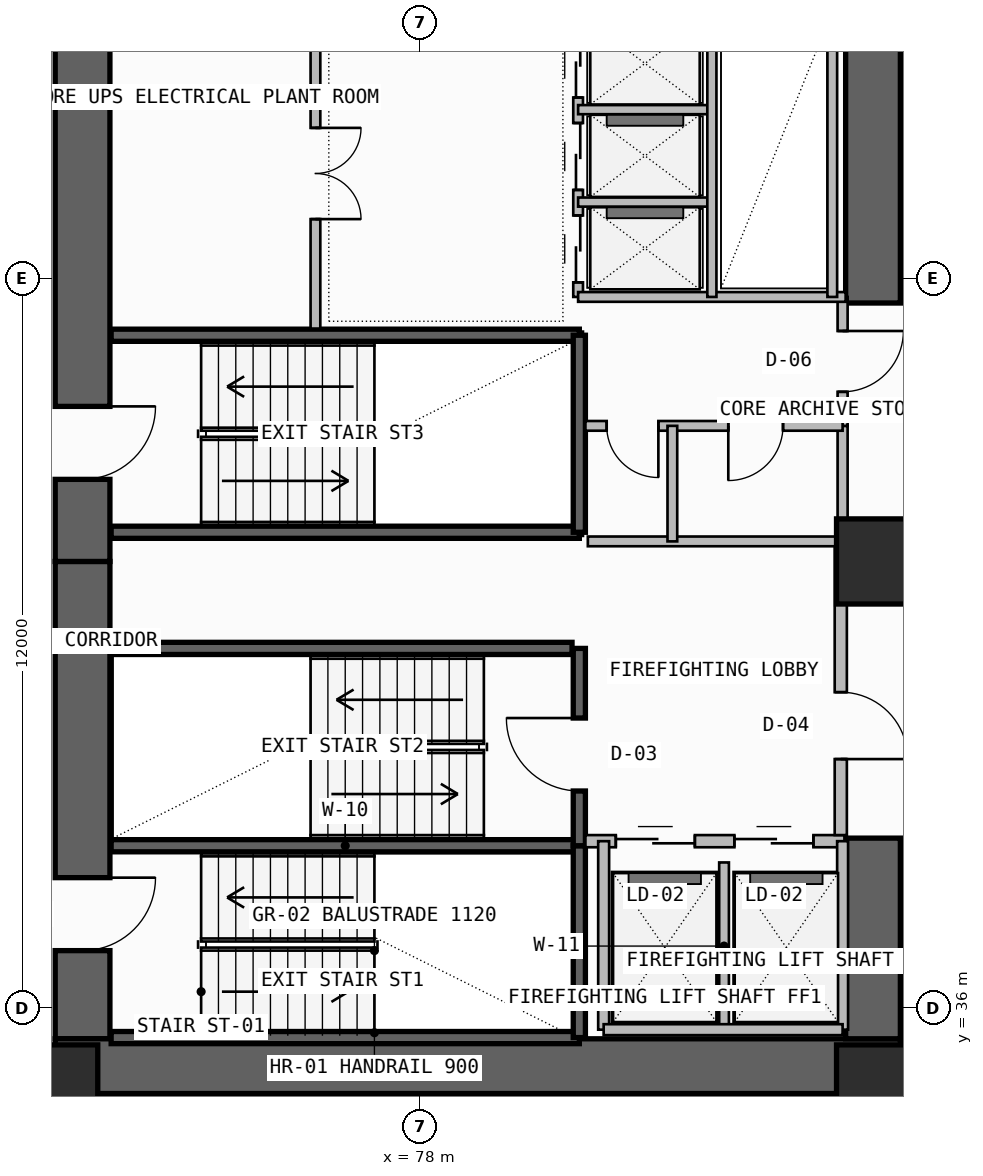
"""IFC4 building model, lengths in metres.
Left out: names, types, materials, properties, quantities, classifications, styles, units other than length and angle.
Written with IfcOpenShell. Run it as: python <this file> out.ifc"""

import sys

from ifc_helpers import new_model, si_unit, direction, frame, frame_2d, origin, origin_2d, place, context, subcontext, project, spatial, rectangle, extrude, element, fill, save


model = new_model("IFC4")
c1 = context("Model", 3, precision=1e-05, world=origin(), true_north=direction((0.0, 1.0)))
c2 = subcontext(c1, "Body", "Model", "MODEL_VIEW")
j1 = project(units=[si_unit("LENGTHUNIT", "METRE"), si_unit("PLANEANGLEUNIT", "RADIAN")], contexts=[c1])
p1 = place(None, origin())
s1 = spatial("IfcSite", under=j1, at=p1, CompositionType="ELEMENT")
p2 = place(p1, origin())
s2 = spatial("IfcBuilding", under=s1, at=p2, CompositionType="ELEMENT")
p3 = place(p2, frame((0.0, 0.0, 139.5)))
s3 = spatial("IfcBuildingStorey", under=s2, at=p3, CompositionType="ELEMENT", Elevation=139.5)
p4 = place(p3, frame((72.45, 35.5, -0.26), z_axis=(0.0, 0.0, 1.0), x_axis=(0.0, 1.0, 0.0)))
e1 = element("IfcWall", 1, at=p4, inside=s3, PredefinedType="SHEAR", context=c2, shape_type="SweptSolid", body=[
    extrude(rectangle(XDim=7.85, YDim=0.9, at=frame_2d((3.925, 0.0))), origin(), (0.0, 0.0, 1.0), 3.6),
])
p5 = place(p4, frame((1.45, 0.0, 0.26)))
e2 = element("IfcOpeningElement", 2, at=p5, cuts=e1, PredefinedType="OPENING", context=c2, shape_type="SweptSolid", body=[
    extrude(rectangle(XDim=1.2, YDim=2.2, at=frame_2d((0.6, 1.1))), frame((0.0, 0.46, 0.0), z_axis=(0.0, -1.0, 0.0), x_axis=(1.0, 0.0, 0.0)), (0.0, 0.0, 1.0), 0.92),
])
p6 = place(p3, frame((72.0, 35.05, -0.26), z_axis=(0.0, 0.0, 1.0), x_axis=(1.0, 0.0, 0.0)))
e3 = element("IfcWall", 3, at=p6, inside=s3, PredefinedType="SHEAR", context=c2, shape_type="SweptSolid", body=[
    extrude(rectangle(XDim=13.9, YDim=0.9, at=frame_2d((6.95, 0.0))), origin(), (0.0, 0.0, 1.0), 3.6),
])
p7 = place(p3, frame((85.45, 35.5, -0.26), z_axis=(0.0, 0.0, 1.0), x_axis=(0.0, 1.0, 0.0)))
e4 = element("IfcWall", 4, at=p7, inside=s3, PredefinedType="SHEAR", context=c2, shape_type="SweptSolid", body=[
    extrude(rectangle(XDim=3.3, YDim=0.9, at=frame_2d((1.65, 0.0))), origin(), (0.0, 0.0, 1.0), 3.6),
])
p8 = place(p3, frame((72.45, 43.35, -0.26), z_axis=(0.0, 0.0, 1.0), x_axis=(0.0, 1.0, 0.0)))
e5 = element("IfcWall", 5, at=p8, inside=s3, PredefinedType="SHEAR", context=c2, shape_type="SweptSolid", body=[
    extrude(rectangle(XDim=12.7, YDim=0.9, at=frame_2d((6.35, 0.0))), origin(), (0.0, 0.0, 1.0), 3.6),
])
p9 = place(p8, frame((1.35, 0.0, 0.26)))
e6 = element("IfcOpeningElement", 6, at=p9, cuts=e5, PredefinedType="OPENING", context=c2, shape_type="SweptSolid", body=[
    extrude(rectangle(XDim=1.2, YDim=2.2, at=frame_2d((0.6, 1.1))), frame((0.0, 0.46, 0.0), z_axis=(0.0, -1.0, 0.0), x_axis=(1.0, 0.0, 0.0)), (0.0, 0.0, 1.0), 0.92),
])
p10 = place(p3, frame((85.45, 47.6, -0.26), z_axis=(0.0, 0.0, 1.0), x_axis=(0.0, 1.0, 0.0)))
e7 = element("IfcWall", 7, at=p10, inside=s3, PredefinedType="SHEAR", context=c2, shape_type="SweptSolid", body=[
    extrude(rectangle(XDim=8.45, YDim=0.9, at=frame_2d((4.225, 0.0))), origin(), (0.0, 0.0, 1.0), 3.6),
])
for number, where, z_axis, x_axis in (
    (8, (72.0, 34.7, 0.0), (0.0, 0.0, 1.0), (1.0, 0.0, 0.0)),
    (9, (85.55, 34.7, 0.0), (0.0, 0.0, 1.0), (1.0, 0.0, 0.0)),
    (10, (85.55, 43.35, 0.0), (0.0, 0.0, 1.0), (1.0, 0.0, 0.0)),
):
    element("IfcColumn", number, at=place(p3, frame(where, z_axis=z_axis, x_axis=x_axis)), inside=s3, PredefinedType="COLUMN", context=c2, shape_type="SweptSolid", body=[
        extrude(rectangle(XDim=1.4, YDim=1.4, at=origin_2d()), origin(), (0.0, 0.0, 1.0), 3.6),
    ])
for number, where, z_axis, x_axis in (
    (11, (72.92, 35.52, -0.26), (0.0, 0.0, 1.0), (1.0, 0.0, 0.0)),
    (12, (72.92, 38.675, -0.26), (0.0, 0.0, 1.0), (1.0, 0.0, 0.0)),
):
    element("IfcWall", number, at=place(p3, frame(where, z_axis=z_axis, x_axis=x_axis)), inside=s3, PredefinedType="SOLIDWALL", context=c2, shape_type="SweptSolid", body=[
        extrude(rectangle(XDim=7.7, YDim=0.2, at=frame_2d((3.85, 0.0))), origin(), (0.0, 0.0, 1.0), 3.6),
    ])
p11 = place(p3, frame((80.62, 35.52, -0.26), z_axis=(0.0, 0.0, 1.0), x_axis=(0.0, 1.0, 0.0)))
e13 = element("IfcWall", 13, at=p11, inside=s3, PredefinedType="SOLIDWALL", context=c2, shape_type="SweptSolid", body=[
    extrude(rectangle(XDim=3.155, YDim=0.2, at=frame_2d((1.578, 0.0))), origin(), (0.0, 0.0, 1.0), 3.6),
])
p12 = place(p3, frame((80.62, 38.675, -0.26), z_axis=(0.0, 0.0, 1.0), x_axis=(0.0, 1.0, 0.0)))
e14 = element("IfcWall", 14, at=p12, inside=s3, PredefinedType="SOLIDWALL", context=c2, shape_type="SweptSolid", body=[
    extrude(rectangle(XDim=3.245, YDim=0.2, at=frame_2d((1.623, 0.0))), origin(), (0.0, 0.0, 1.0), 3.6),
])
p13 = place(p12, frame((0.9, 0.0, 0.26)))
e15 = element("IfcOpeningElement", 15, at=p13, cuts=e14, PredefinedType="OPENING", context=c2, shape_type="SweptSolid", body=[
    extrude(rectangle(XDim=1.2, YDim=2.2, at=frame_2d((0.6, 1.1))), frame((0.0, 0.11, 0.0), z_axis=(0.0, -1.0, 0.0), x_axis=(1.0, 0.0, 0.0)), (0.0, 0.0, 1.0), 0.22),
])
p14 = place(p3, frame((80.72, 38.75, 0.0), z_axis=(0.0, 0.0, 1.0), x_axis=(1.0, 0.0, 0.0)))
e16 = element("IfcWall", 16, at=p14, inside=s3, PredefinedType="SOLIDWALL", context=c2, shape_type="SweptSolid", body=[
    extrude(rectangle(XDim=4.26, YDim=0.2, at=frame_2d((2.13, 0.0))), origin(), (0.0, 0.0, 1.0), 3.34),
])
p15 = place(p14, frame((0.5, 0.0, 0.0)))
e17 = element("IfcOpeningElement", 17, at=p15, cuts=e16, PredefinedType="OPENING", context=c2, shape_type="SweptSolid", body=[
    extrude(rectangle(XDim=1.3, YDim=2.3, at=frame_2d((0.65, 1.15))), frame((0.0, 0.11, 0.0), z_axis=(0.0, -1.0, 0.0), x_axis=(1.0, 0.0, 0.0)), (0.0, 0.0, 1.0), 0.22),
])
p16 = place(p14, frame((2.45, 0.0, 0.0)))
e18 = element("IfcOpeningElement", 18, at=p16, cuts=e16, PredefinedType="OPENING", context=c2, shape_type="SweptSolid", body=[
    extrude(rectangle(XDim=1.3, YDim=2.3, at=frame_2d((0.65, 1.15))), frame((0.0, 0.11, 0.0), z_axis=(0.0, -1.0, 0.0), x_axis=(1.0, 0.0, 0.0)), (0.0, 0.0, 1.0), 0.22),
])
p17 = place(p3, frame((83.0, 35.65, 0.0), z_axis=(0.0, 0.0, 1.0), x_axis=(0.0, 1.0, 0.0)))
e19 = element("IfcWall", 19, at=p17, inside=s3, PredefinedType="PLUMBINGWALL", context=c2, shape_type="SweptSolid", body=[
    extrude(rectangle(XDim=2.75, YDim=0.16, at=frame_2d((1.375, 0.0))), origin(), (0.0, 0.0, 1.0), 3.34),
])
for number, where, z_axis, x_axis in (
    (20, (84.95, 35.65, 0.0), (0.0, 0.0, 1.0), (0.0, 1.0, 0.0)),
    (21, (81.02, 35.65, 0.0), (0.0, 0.0, 1.0), (0.0, 1.0, 0.0)),
):
    element("IfcWall", number, at=place(p3, frame(where, z_axis=z_axis, x_axis=x_axis)), inside=s3, PredefinedType="SOLIDWALL", context=c2, shape_type="SweptSolid", body=[
        extrude(rectangle(XDim=3.1, YDim=0.18, at=frame_2d((1.55, 0.0))), origin(), (0.0, 0.0, 1.0), 3.34),
    ])
p18 = place(p3, frame((81.02, 35.65, 0.0), z_axis=(0.0, 0.0, 1.0), x_axis=(1.0, 0.0, 0.0)))
e22 = element("IfcWall", 22, at=p18, inside=s3, PredefinedType="SOLIDWALL", context=c2, shape_type="SweptSolid", body=[
    extrude(rectangle(XDim=3.93, YDim=0.18, at=frame_2d((1.965, 0.0))), origin(), (0.0, 0.0, 1.0), 3.34),
])
p19 = place(p3, frame((84.92, 38.85, 0.0), z_axis=(0.0, 0.0, 1.0), x_axis=(0.0, 1.0, 0.0)))
e23 = element("IfcWall", 23, at=p19, inside=s3, PredefinedType="SOLIDWALL", context=c2, shape_type="SweptSolid", body=[
    extrude(rectangle(XDim=4.83, YDim=0.2, at=frame_2d((2.415, 0.0))), origin(), (0.0, 0.0, 1.0), 3.34),
])
p20 = place(p19, frame((1.25, 0.0, 0.0)))
e24 = element("IfcOpeningElement", 24, at=p20, cuts=e23, PredefinedType="OPENING", context=c2, shape_type="SweptSolid", body=[
    extrude(rectangle(XDim=1.1, YDim=2.2, at=frame_2d((0.55, 1.1))), frame((0.0, 0.11, 0.0), z_axis=(0.0, -1.0, 0.0), x_axis=(1.0, 0.0, 0.0)), (0.0, 0.0, 1.0), 0.22),
])
p21 = place(p3, frame((72.92, 41.92, -0.26), z_axis=(0.0, 0.0, 1.0), x_axis=(1.0, 0.0, 0.0)))
e25 = element("IfcWall", 25, at=p21, inside=s3, PredefinedType="SOLIDWALL", context=c2, shape_type="SweptSolid", body=[
    extrude(rectangle(XDim=7.58, YDim=0.2, at=frame_2d((3.79, 0.0))), origin(), (0.0, 0.0, 1.0), 3.6),
])
for number, where, z_axis, x_axis in (
    (26, (72.92, 43.83, -0.26), (0.0, 0.0, 1.0), (1.0, 0.0, 0.0)),
    (27, (72.92, 47.07, -0.26), (0.0, 0.0, 1.0), (1.0, 0.0, 0.0)),
):
    element("IfcWall", number, at=place(p3, frame(where, z_axis=z_axis, x_axis=x_axis)), inside=s3, PredefinedType="SOLIDWALL", context=c2, shape_type="SweptSolid", body=[
        extrude(rectangle(XDim=7.7, YDim=0.2, at=frame_2d((3.85, 0.0))), origin(), (0.0, 0.0, 1.0), 3.6),
    ])
p22 = place(p3, frame((80.62, 43.83, -0.26), z_axis=(0.0, 0.0, 1.0), x_axis=(0.0, 1.0, 0.0)))
e28 = element("IfcWall", 28, at=p22, inside=s3, PredefinedType="SOLIDWALL", context=c2, shape_type="SweptSolid", body=[
    extrude(rectangle(XDim=3.24, YDim=0.2, at=frame_2d((1.62, 0.0))), origin(), (0.0, 0.0, 1.0), 3.6),
])
p23 = place(p3, frame((84.95, 43.68, 0.0), z_axis=(0.0, 0.0, 1.0), x_axis=(0.0, 1.0, 0.0)))
e29 = element("IfcWall", 29, at=p23, inside=s3, PredefinedType="PLUMBINGWALL", context=c2, shape_type="SweptSolid", body=[
    extrude(rectangle(XDim=1.9, YDim=0.165, at=frame_2d((0.95, 0.0))), origin(), (0.0, 0.0, 1.0), 3.34),
])
p24 = place(p3, frame((84.95, 45.58, 0.0), z_axis=(0.0, 0.0, 1.0), x_axis=(0.0, 1.0, 0.0)))
e30 = element("IfcWall", 30, at=p24, inside=s3, PredefinedType="PARTITIONING", context=c2, shape_type="SweptSolid", body=[
    extrude(rectangle(XDim=2.12, YDim=0.165, at=frame_2d((1.06, 0.0))), origin(), (0.0, 0.0, 1.0), 3.34),
])
p25 = place(p24, frame((0.56, 0.0, 0.0)))
e31 = element("IfcOpeningElement", 31, at=p25, cuts=e30, PredefinedType="OPENING", context=c2, shape_type="SweptSolid", body=[
    extrude(rectangle(XDim=1.0, YDim=2.2, at=frame_2d((0.5, 1.1))), frame((0.0, 0.093, 0.0), z_axis=(0.0, -1.0, 0.0), x_axis=(1.0, 0.0, 0.0)), (0.0, 0.0, 1.0), 0.185),
])
p26 = place(p3, frame((80.72, 45.58, 0.0), z_axis=(0.0, 0.0, 1.0), x_axis=(1.0, 0.0, 0.0)))
e32 = element("IfcWall", 32, at=p26, inside=s3, PredefinedType="PLUMBINGWALL", context=c2, shape_type="SweptSolid", body=[
    extrude(rectangle(XDim=4.23, YDim=0.16, at=frame_2d((2.115, 0.0))), origin(), (0.0, 0.0, 1.0), 3.34),
])
p27 = place(p26, frame((0.35, 0.0, 0.0)))
e33 = element("IfcOpeningElement", 33, at=p27, cuts=e32, PredefinedType="OPENING", context=c2, shape_type="SweptSolid", body=[
    extrude(rectangle(XDim=0.85, YDim=2.05, at=frame_2d((0.425, 1.025))), frame((0.0, 0.09, 0.0), z_axis=(0.0, -1.0, 0.0), x_axis=(1.0, 0.0, 0.0)), (0.0, 0.0, 1.0), 0.18),
])
p28 = place(p26, frame((2.35, 0.0, 0.0)))
e34 = element("IfcOpeningElement", 34, at=p28, cuts=e32, PredefinedType="OPENING", context=c2, shape_type="SweptSolid", body=[
    extrude(rectangle(XDim=0.9, YDim=2.1, at=frame_2d((0.45, 1.05))), frame((0.0, 0.09, 0.0), z_axis=(0.0, -1.0, 0.0), x_axis=(1.0, 0.0, 0.0)), (0.0, 0.0, 1.0), 0.18),
])
p29 = place(p3, frame((80.76, 43.68, 0.0), z_axis=(0.0, 0.0, 1.0), x_axis=(1.0, 0.0, 0.0)))
e35 = element("IfcWall", 35, at=p29, inside=s3, PredefinedType="PLUMBINGWALL", context=c2, shape_type="SweptSolid", body=[
    extrude(rectangle(XDim=4.19, YDim=0.16, at=frame_2d((2.095, 0.0))), origin(), (0.0, 0.0, 1.0), 3.34),
])
p30 = place(p3, frame((82.15, 43.68, 0.0), z_axis=(0.0, 0.0, 1.0), x_axis=(0.0, 1.0, 0.0)))
e36 = element("IfcWall", 36, at=p30, inside=s3, PredefinedType="PLUMBINGWALL", context=c2, shape_type="SweptSolid", body=[
    extrude(rectangle(XDim=1.9, YDim=0.16, at=frame_2d((0.95, 0.0))), origin(), (0.0, 0.0, 1.0), 3.34),
])
p31 = place(p3, frame((76.28, 47.18, 0.0), z_axis=(0.0, 0.0, 1.0), x_axis=(0.0, 1.0, 0.0)))
e37 = element("IfcWall", 37, at=p31, inside=s3, PredefinedType="SOLIDWALL", context=c2, shape_type="SweptSolid", body=[
    extrude(rectangle(XDim=5.14, YDim=0.16, at=frame_2d((2.57, 0.0))), origin(), (0.0, 0.0, 1.0), 3.34),
])
p32 = place(p31, frame((1.8, 0.0, 0.0)))
e38 = element("IfcOpeningElement", 38, at=p32, cuts=e37, PredefinedType="OPENING", context=c2, shape_type="SweptSolid", body=[
    extrude(rectangle(XDim=1.5, YDim=2.25, at=frame_2d((0.75, 1.125))), frame((0.0, 0.09, 0.0), z_axis=(0.0, -1.0, 0.0), x_axis=(1.0, 0.0, 0.0)), (0.0, 0.0, 1.0), 0.18),
])
p33 = place(p3, frame((80.6, 47.7, 0.0), z_axis=(0.0, 0.0, 1.0), x_axis=(0.0, 1.0, 0.0)))
e39 = element("IfcWall", 39, at=p33, inside=s3, PredefinedType="SOLIDWALL", context=c2, shape_type="SweptSolid", body=[
    extrude(rectangle(XDim=4.6, YDim=0.16, at=frame_2d((2.3, 0.0))), origin(), (0.0, 0.0, 1.0), 3.34),
])
p34 = place(p33, frame((0.24, 0.0, 0.0)))
e40 = element("IfcOpeningElement", 40, at=p34, cuts=e39, PredefinedType="OPENING", context=c2, shape_type="SweptSolid", body=[
    extrude(rectangle(XDim=1.1, YDim=2.25, at=frame_2d((0.55, 1.125))), frame((0.0, 0.09, 0.0), z_axis=(0.0, -1.0, 0.0), x_axis=(1.0, 0.0, 0.0)), (0.0, 0.0, 1.0), 0.18),
])
p35 = place(p33, frame((1.76, 0.0, 0.0)))
e41 = element("IfcOpeningElement", 41, at=p35, cuts=e39, PredefinedType="OPENING", context=c2, shape_type="SweptSolid", body=[
    extrude(rectangle(XDim=1.1, YDim=2.25, at=frame_2d((0.55, 1.125))), frame((0.0, 0.09, 0.0), z_axis=(0.0, -1.0, 0.0), x_axis=(1.0, 0.0, 0.0)), (0.0, 0.0, 1.0), 0.18),
])
p36 = place(p33, frame((3.28, 0.0, 0.0)))
e42 = element("IfcOpeningElement", 42, at=p36, cuts=e39, PredefinedType="OPENING", context=c2, shape_type="SweptSolid", body=[
    extrude(rectangle(XDim=1.1, YDim=2.25, at=frame_2d((0.55, 1.125))), frame((0.0, 0.09, 0.0), z_axis=(0.0, -1.0, 0.0), x_axis=(1.0, 0.0, 0.0)), (0.0, 0.0, 1.0), 0.18),
])
p37 = place(p3, frame((80.6, 47.7, 0.0), z_axis=(0.0, 0.0, 1.0), x_axis=(1.0, 0.0, 0.0)))
e43 = element("IfcWall", 43, at=p37, inside=s3, PredefinedType="SOLIDWALL", context=c2, shape_type="SweptSolid", body=[
    extrude(rectangle(XDim=4.4, YDim=0.16, at=frame_2d((2.2, 0.0))), origin(), (0.0, 0.0, 1.0), 3.34),
])
for number, where, z_axis, x_axis in (
    (44, (80.6, 49.26, 0.0), (0.0, 0.0, 1.0), (1.0, 0.0, 0.0)),
    (45, (80.6, 50.78, 0.0), (0.0, 0.0, 1.0), (1.0, 0.0, 0.0)),
):
    element("IfcWall", number, at=place(p3, frame(where, z_axis=z_axis, x_axis=x_axis)), inside=s3, PredefinedType="PLUMBINGWALL", context=c2, shape_type="SweptSolid", body=[
        extrude(rectangle(XDim=2.2, YDim=0.15, at=frame_2d((1.1, 0.0))), origin(), (0.0, 0.0, 1.0), 3.34),
    ])
p38 = place(p3, frame((82.8, 47.7, 0.0), z_axis=(0.0, 0.0, 1.0), x_axis=(0.0, 1.0, 0.0)))
e46 = element("IfcWall", 46, at=p38, inside=s3, PredefinedType="PLUMBINGWALL", context=c2, shape_type="SweptSolid", body=[
    extrude(rectangle(XDim=4.6, YDim=0.15, at=frame_2d((2.3, 0.0))), origin(), (0.0, 0.0, 1.0), 3.34),
])
p39 = place(p3, frame((84.78, 47.7, 0.0), z_axis=(0.0, 0.0, 1.0), x_axis=(0.0, 1.0, 0.0)))
e47 = element("IfcWall", 47, at=p39, inside=s3, PredefinedType="SOLIDWALL", context=c2, shape_type="SweptSolid", body=[
    extrude(rectangle(XDim=4.6, YDim=0.16, at=frame_2d((2.3, 0.0))), origin(), (0.0, 0.0, 1.0), 3.34),
])
p40 = place(p5, frame((1.2, 0.0, 0.0), z_axis=(0.0, 0.0, 1.0), x_axis=(-1.0, 0.0, 0.0)))
e48 = element("IfcDoor", 48, at=p40, inside=s3, OperationType="SINGLE_SWING_LEFT", PredefinedType="USERDEFINED", context=c2, shape_type="SweptSolid", body=[
    extrude(rectangle(XDim=1.2, YDim=2.2, at=frame_2d((0.6, 1.1))), frame((0.0, 0.025, 0.0), z_axis=(0.0, -1.0, 0.0), x_axis=(1.0, 0.0, 0.0)), (0.0, 0.0, 1.0), 0.05),
])
fill(e2, e48)
p41 = place(p13, origin())
e49 = element("IfcDoor", 49, at=p41, inside=s3, OperationType="SINGLE_SWING_RIGHT", PredefinedType="USERDEFINED", context=c2, shape_type="SweptSolid", body=[
    extrude(rectangle(XDim=1.2, YDim=2.2, at=frame_2d((0.6, 1.1))), frame((0.0, 0.025, 0.0), z_axis=(0.0, -1.0, 0.0), x_axis=(1.0, 0.0, 0.0)), (0.0, 0.0, 1.0), 0.05),
])
fill(e15, e49)
p42 = place(p15, origin())
e50 = element("IfcDoor", 50, at=p42, inside=s3, OperationType="DOUBLE_DOOR_SLIDING", PredefinedType="DOOR", context=c2, shape_type="SweptSolid", body=[
    extrude(rectangle(XDim=1.3, YDim=2.3, at=frame_2d((0.65, 1.15))), frame((0.0, 0.025, 0.0), z_axis=(0.0, -1.0, 0.0), x_axis=(1.0, 0.0, 0.0)), (0.0, 0.0, 1.0), 0.05),
])
fill(e17, e50)
p43 = place(p16, origin())
e51 = element("IfcDoor", 51, at=p43, inside=s3, OperationType="DOUBLE_DOOR_SLIDING", PredefinedType="DOOR", context=c2, shape_type="SweptSolid", body=[
    extrude(rectangle(XDim=1.3, YDim=2.3, at=frame_2d((0.65, 1.15))), frame((0.0, 0.025, 0.0), z_axis=(0.0, -1.0, 0.0), x_axis=(1.0, 0.0, 0.0)), (0.0, 0.0, 1.0), 0.05),
])
fill(e18, e51)
p44 = place(p20, frame((1.1, 0.0, 0.0), z_axis=(0.0, 0.0, 1.0), x_axis=(-1.0, 0.0, 0.0)))
e52 = element("IfcDoor", 52, at=p44, inside=s3, OperationType="SINGLE_SWING_RIGHT", PredefinedType="DOOR", context=c2, shape_type="SweptSolid", body=[
    extrude(rectangle(XDim=1.1, YDim=2.2, at=frame_2d((0.55, 1.1))), frame((0.0, 0.025, 0.0), z_axis=(0.0, -1.0, 0.0), x_axis=(1.0, 0.0, 0.0)), (0.0, 0.0, 1.0), 0.05),
])
fill(e24, e52)
p45 = place(p9, frame((1.2, 0.0, 0.0), z_axis=(0.0, 0.0, 1.0), x_axis=(-1.0, 0.0, 0.0)))
e53 = element("IfcDoor", 53, at=p45, inside=s3, OperationType="SINGLE_SWING_LEFT", PredefinedType="USERDEFINED", context=c2, shape_type="SweptSolid", body=[
    extrude(rectangle(XDim=1.2, YDim=2.2, at=frame_2d((0.6, 1.1))), frame((0.0, 0.025, 0.0), z_axis=(0.0, -1.0, 0.0), x_axis=(1.0, 0.0, 0.0)), (0.0, 0.0, 1.0), 0.05),
])
fill(e6, e53)
p46 = place(p25, frame((1.0, 0.0, 0.0), z_axis=(0.0, 0.0, 1.0), x_axis=(-1.0, 0.0, 0.0)))
e54 = element("IfcDoor", 54, at=p46, inside=s3, OperationType="SINGLE_SWING_LEFT", PredefinedType="DOOR", context=c2, shape_type="SweptSolid", body=[
    extrude(rectangle(XDim=1.0, YDim=2.2, at=frame_2d((0.5, 1.1))), frame((0.0, 0.025, 0.0), z_axis=(0.0, -1.0, 0.0), x_axis=(1.0, 0.0, 0.0)), (0.0, 0.0, 1.0), 0.05),
])
fill(e31, e54)
p47 = place(p27, frame((0.85, 0.0, 0.0), z_axis=(0.0, 0.0, 1.0), x_axis=(-1.0, 0.0, 0.0)))
e55 = element("IfcDoor", 55, at=p47, inside=s3, OperationType="SINGLE_SWING_LEFT", PredefinedType="DOOR", context=c2, shape_type="SweptSolid", body=[
    extrude(rectangle(XDim=0.85, YDim=2.05, at=frame_2d((0.425, 1.025))), frame((0.0, 0.025, 0.0), z_axis=(0.0, -1.0, 0.0), x_axis=(1.0, 0.0, 0.0)), (0.0, 0.0, 1.0), 0.05),
])
fill(e33, e55)
p48 = place(p28, frame((0.9, 0.0, 0.0), z_axis=(0.0, 0.0, 1.0), x_axis=(-1.0, 0.0, 0.0)))
e56 = element("IfcDoor", 56, at=p48, inside=s3, OperationType="SINGLE_SWING_RIGHT", PredefinedType="DOOR", context=c2, shape_type="SweptSolid", body=[
    extrude(rectangle(XDim=0.9, YDim=2.1, at=frame_2d((0.45, 1.05))), frame((0.0, 0.025, 0.0), z_axis=(0.0, -1.0, 0.0), x_axis=(1.0, 0.0, 0.0)), (0.0, 0.0, 1.0), 0.05),
])
fill(e34, e56)
p49 = place(p32, frame((1.5, 0.0, 0.0), z_axis=(0.0, 0.0, 1.0), x_axis=(-1.0, 0.0, 0.0)))
e57 = element("IfcDoor", 57, at=p49, inside=s3, OperationType="DOUBLE_DOOR_SINGLE_SWING", PredefinedType="DOOR", context=c2, shape_type="SweptSolid", body=[
    extrude(rectangle(XDim=1.5, YDim=2.25, at=frame_2d((0.75, 1.125))), frame((0.0, 0.025, 0.0), z_axis=(0.0, -1.0, 0.0), x_axis=(1.0, 0.0, 0.0)), (0.0, 0.0, 1.0), 0.05),
])
fill(e38, e57)
p50 = place(p34, frame((1.1, 0.0, 0.0), z_axis=(0.0, 0.0, 1.0), x_axis=(-1.0, 0.0, 0.0)))
e58 = element("IfcDoor", 58, at=p50, inside=s3, OperationType="DOUBLE_DOOR_SLIDING", PredefinedType="DOOR", context=c2, shape_type="SweptSolid", body=[
    extrude(rectangle(XDim=1.1, YDim=2.25, at=frame_2d((0.55, 1.125))), frame((0.0, 0.025, 0.0), z_axis=(0.0, -1.0, 0.0), x_axis=(1.0, 0.0, 0.0)), (0.0, 0.0, 1.0), 0.05),
])
fill(e40, e58)
p51 = place(p35, frame((1.1, 0.0, 0.0), z_axis=(0.0, 0.0, 1.0), x_axis=(-1.0, 0.0, 0.0)))
e59 = element("IfcDoor", 59, at=p51, inside=s3, OperationType="DOUBLE_DOOR_SLIDING", PredefinedType="DOOR", context=c2, shape_type="SweptSolid", body=[
    extrude(rectangle(XDim=1.1, YDim=2.25, at=frame_2d((0.55, 1.125))), frame((0.0, 0.025, 0.0), z_axis=(0.0, -1.0, 0.0), x_axis=(1.0, 0.0, 0.0)), (0.0, 0.0, 1.0), 0.05),
])
fill(e41, e59)
p52 = place(p36, frame((1.1, 0.0, 0.0), z_axis=(0.0, 0.0, 1.0), x_axis=(-1.0, 0.0, 0.0)))
e60 = element("IfcDoor", 60, at=p52, inside=s3, OperationType="DOUBLE_DOOR_SLIDING", PredefinedType="DOOR", context=c2, shape_type="SweptSolid", body=[
    extrude(rectangle(XDim=1.1, YDim=2.25, at=frame_2d((0.55, 1.125))), frame((0.0, 0.025, 0.0), z_axis=(0.0, -1.0, 0.0), x_axis=(1.0, 0.0, 0.0)), (0.0, 0.0, 1.0), 0.05),
])
fill(e42, e60)
save(model, sys.argv[1])
